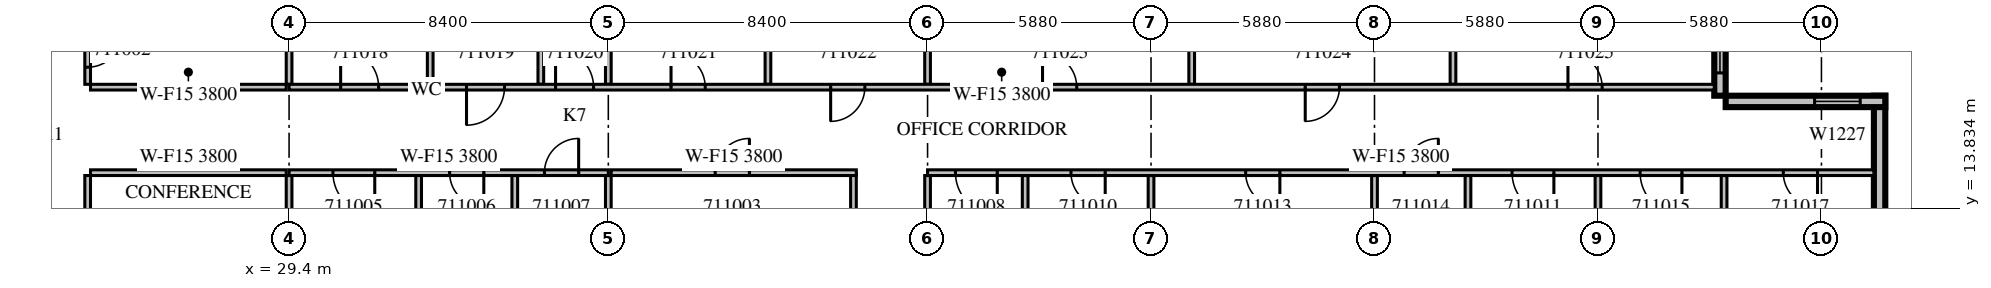
"""IFC4 building model, lengths in metres.
Left out: names, types, materials, properties, quantities, classifications, styles, units other than length and angle.
Written with IfcOpenShell. Run it as: python <this file> out.ifc"""

import sys

from ifc_helpers import new_model, si_unit, direction, frame, frame_2d, origin, place, context, subcontext, project, spatial, rectangle, extrude, source, transform, mapped, element, fill, save


model = new_model("IFC4")
c1 = context("Model", 3, precision=1e-05, world=origin(), true_north=direction((0.0, 1.0)))
c2 = subcontext(c1, "Body", "Model", "MODEL_VIEW")
j1 = project(units=[si_unit("LENGTHUNIT", "METRE"), si_unit("PLANEANGLEUNIT", "RADIAN")], contexts=[c1])
p1 = place(None, origin())
s1 = spatial("IfcSite", under=j1, at=p1, CompositionType="ELEMENT")
p2 = place(p1, origin())
s2 = spatial("IfcBuilding", under=s1, at=p2, CompositionType="ELEMENT")
p3 = place(p2, frame((0.0, 0.0, 57.3)))
s3 = spatial("IfcBuildingStorey", under=s2, at=p3, CompositionType="ELEMENT", Elevation=57.3)
m1 = source(origin(), c2, "Body", "SweptSolid", [
    extrude(rectangle(XDim=6.3, YDim=0.3, at=frame_2d((3.15, 0.0))), origin(), (0.0, 0.0, 1.0), 3.8),
])
p4 = place(p3, frame((71.25, 10.5, 0.0), z_axis=(0.0, 0.0, 1.0), x_axis=(0.0, 1.0, 0.0)))
e1 = element("IfcWall", 1, at=p4, inside=s3, PredefinedType="STANDARD", context=c2, shape_type="MappedRepresentation", body=[
    mapped(m1, transform((0.0, 0.0, 0.0), scale=1.0)),
])
m2 = source(origin(), c2, "Body", "SweptSolid", [
    extrude(rectangle(XDim=1.2, YDim=2.7, at=frame_2d((0.6, 1.35))), frame((0.0, 0.16, 0.0), z_axis=(0.0, -1.0, 0.0), x_axis=(1.0, 0.0, 0.0)), (0.0, 0.0, 1.0), 0.32),
])
p5 = place(p4, frame((1.062, 0.0, 0.6)))
e2 = element("IfcOpeningElement", 2, at=p5, cuts=e1, PredefinedType="OPENING", context=c2, shape_type="MappedRepresentation", body=[
    mapped(m2, transform((0.0, 0.0, 0.0), scale=1.0)),
])
m3 = source(origin(), c2, "Body", "SweptSolid", [
    extrude(rectangle(XDim=4.2, YDim=0.3, at=frame_2d((2.1, 0.0))), origin(), (0.0, 0.0, 1.0), 3.8),
])
p6 = place(p3, frame((71.4, 16.65, 0.0), z_axis=(0.0, 0.0, 1.0), x_axis=(-1.0, 0.0, 0.0)))
e3 = element("IfcWall", 3, at=p6, inside=s3, PredefinedType="STANDARD", context=c2, shape_type="MappedRepresentation", body=[
    mapped(m3, transform((0.0, 0.0, 0.0), scale=1.0)),
])
p7 = place(p6, frame((0.66, 0.0, 0.6)))
e4 = element("IfcOpeningElement", 4, at=p7, cuts=e3, PredefinedType="OPENING", context=c2, shape_type="MappedRepresentation", body=[
    mapped(m2, transform((0.0, 0.0, 0.0), scale=1.0)),
])
p8 = place(p3, frame((67.05, 16.8, 0.0), z_axis=(0.0, 0.0, 1.0), x_axis=(0.0, 1.0, 0.0)))
e5 = element("IfcWall", 5, at=p8, inside=s3, PredefinedType="STANDARD", context=c2, shape_type="MappedRepresentation", body=[
    mapped(m3, transform((0.0, 0.0, 0.0), scale=1.0)),
])
m4 = source(origin(), c2, "Body", "SweptSolid", [
    extrude(rectangle(XDim=3.0, YDim=2.7, at=frame_2d((1.5, 1.35))), frame((0.0, 0.16, 0.0), z_axis=(0.0, -1.0, 0.0), x_axis=(1.0, 0.0, 0.0)), (0.0, 0.0, 1.0), 0.32),
])
p9 = place(p8, frame((0.6, 0.0, 0.6)))
e6 = element("IfcOpeningElement", 6, at=p9, cuts=e5, PredefinedType="OPENING", context=c2, shape_type="MappedRepresentation", body=[
    mapped(m4, transform((0.0, 0.0, 0.0), scale=1.0)),
])
p10 = place(p3, frame((24.1, 14.7, 0.0), z_axis=(0.0, 0.0, 1.0), x_axis=(0.0, -1.0, 0.0)))
e7 = element("IfcWall", 7, at=p10, inside=s3, PredefinedType="PARTITIONING", context=c2, shape_type="SweptSolid", body=[
    extrude(rectangle(XDim=3.995, YDim=0.15, at=frame_2d((1.998, 0.0))), origin(), (0.0, 0.0, 1.0), 3.8),
])
m5 = source(origin(), c2, "Body", "SweptSolid", [
    extrude(rectangle(XDim=0.9, YDim=2.1, at=frame_2d((0.45, 1.05))), frame((0.0, 0.085, 0.0), z_axis=(0.0, -1.0, 0.0), x_axis=(1.0, 0.0, 0.0)), (0.0, 0.0, 1.0), 0.17),
])
p11 = place(p10, frame((0.963, 0.0, 0.0)))
e8 = element("IfcOpeningElement", 8, at=p11, cuts=e7, PredefinedType="OPENING", context=c2, shape_type="MappedRepresentation", body=[
    mapped(m5, transform((0.0, 0.0, 0.0), scale=1.0)),
])
m6 = source(origin(), c2, "Body", "SweptSolid", [
    extrude(rectangle(XDim=3.6, YDim=0.15, at=frame_2d((1.8, 0.0))), origin(), (0.0, 0.0, 1.0), 3.8),
])
p12 = place(p3, frame((24.1, 20.7, 0.0), z_axis=(0.0, 0.0, 1.0), x_axis=(0.0, -1.0, 0.0)))
e9 = element("IfcWall", 9, at=p12, inside=s3, PredefinedType="PARTITIONING", context=c2, shape_type="MappedRepresentation", body=[
    mapped(m6, transform((0.0, 0.0, 0.0), scale=1.0)),
])
p13 = place(p12, frame((2.25, 0.0, 0.0)))
e10 = element("IfcOpeningElement", 10, at=p13, cuts=e9, PredefinedType="OPENING", context=c2, shape_type="MappedRepresentation", body=[
    mapped(m5, transform((0.0, 0.0, 0.0), scale=1.0)),
])
m7 = source(origin(), c2, "Body", "SweptSolid", [
    extrude(rectangle(XDim=5.15, YDim=0.15, at=frame_2d((2.575, 0.0))), origin(), (0.0, 0.0, 1.0), 3.8),
])
for number, where, z_axis, x_axis in (
    (11, (29.325, 14.775, 0.0), (0.0, 0.0, 1.0), (-1.0, 0.0, 0.0)),
    (12, (24.175, 17.025, 0.0), (0.0, 0.0, 1.0), (1.0, 0.0, 0.0)),
):
    element("IfcWall", number, at=place(p3, frame(where, z_axis=z_axis, x_axis=x_axis)), inside=s3, PredefinedType="PARTITIONING", context=c2, shape_type="MappedRepresentation", body=[
        mapped(m7, transform((0.0, 0.0, 0.0), scale=1.0)),
    ])
p14 = place(p3, frame((29.4, 11.099, 0.0), z_axis=(0.0, 0.0, 1.0), x_axis=(0.0, 1.0, 0.0)))
e13 = element("IfcWall", 13, at=p14, inside=s3, PredefinedType="PARTITIONING", context=c2, shape_type="SweptSolid", body=[
    extrude(rectangle(XDim=3.601, YDim=0.15, at=frame_2d((1.8, 0.0))), origin(), (0.0, 0.0, 1.0), 3.8),
])
m8 = source(origin(), c2, "Body", "SweptSolid", [
    extrude(rectangle(XDim=2.701, YDim=0.15, at=frame_2d((1.351, 0.0))), origin(), (0.0, 0.0, 1.0), 3.8),
])
p15 = place(p3, frame((29.4, 17.1, 0.0), z_axis=(0.0, 0.0, 1.0), x_axis=(0.0, 1.0, 0.0)))
e14 = element("IfcWall", 14, at=p15, inside=s3, PredefinedType="PARTITIONING", context=c2, shape_type="MappedRepresentation", body=[
    mapped(m8, transform((0.0, 0.0, 0.0), scale=1.0)),
])
p16 = place(p3, frame((44.25, 11.9, 0.0), z_axis=(0.0, 0.0, 1.0), x_axis=(0.0, 1.0, 0.0)))
e15 = element("IfcWall", 15, at=p16, inside=s3, PredefinedType="PARTITIONING", context=c2, shape_type="SweptSolid", body=[
    extrude(rectangle(XDim=2.875, YDim=0.15, at=frame_2d((1.438, 0.0))), origin(), (0.0, 0.0, 1.0), 3.8),
])
m9 = source(origin(), c2, "Body", "SweptSolid", [
    extrude(rectangle(XDim=6.45, YDim=0.15, at=frame_2d((3.225, 0.0))), origin(), (0.0, 0.0, 1.0), 3.8),
])
p17 = place(p3, frame((44.325, 14.775, 0.0), z_axis=(0.0, 0.0, 1.0), x_axis=(-1.0, 0.0, 0.0)))
e16 = element("IfcWall", 16, at=p17, inside=s3, PredefinedType="PARTITIONING", context=c2, shape_type="MappedRepresentation", body=[
    mapped(m9, transform((0.0, 0.0, 0.0), scale=1.0)),
])
p18 = place(p17, frame((2.812, 0.0, 0.0)))
e17 = element("IfcOpeningElement", 17, at=p18, cuts=e16, PredefinedType="OPENING", context=c2, shape_type="MappedRepresentation", body=[
    mapped(m5, transform((0.0, 0.0, 0.0), scale=1.0)),
])
m10 = source(origin(), c2, "Body", "SweptSolid", [
    extrude(rectangle(XDim=3.995, YDim=0.15, at=frame_2d((1.998, 0.0))), origin(), (0.0, 0.0, 1.0), 3.8),
])
for number, where, z_axis, x_axis in (
    (18, (32.809, 10.705, 0.0), (0.0, 0.0, 1.0), (0.0, 1.0, 0.0)),
    (19, (35.339, 10.705, 0.0), (0.0, 0.0, 1.0), (0.0, 1.0, 0.0)),
):
    element("IfcWall", number, at=place(p3, frame(where, z_axis=z_axis, x_axis=x_axis)), inside=s3, PredefinedType="PARTITIONING", context=c2, shape_type="MappedRepresentation", body=[
        mapped(m10, transform((0.0, 0.0, 0.0), scale=1.0)),
    ])
m11 = source(origin(), c2, "Body", "SweptSolid", [
    extrude(rectangle(XDim=3.601, YDim=0.15, at=frame_2d((1.8, 0.0))), origin(), (0.0, 0.0, 1.0), 3.8),
])
p19 = place(p3, frame((37.8, 11.099, 0.0), z_axis=(0.0, 0.0, 1.0), x_axis=(0.0, 1.0, 0.0)))
e20 = element("IfcWall", 20, at=p19, inside=s3, PredefinedType="PARTITIONING", context=c2, shape_type="MappedRepresentation", body=[
    mapped(m11, transform((0.0, 0.0, 0.0), scale=1.0)),
])
p20 = place(p3, frame((48.768, 11.25, 0.0), z_axis=(0.0, 0.0, 1.0), x_axis=(0.0, 1.0, 0.0)))
e21 = element("IfcWall", 21, at=p20, inside=s3, PredefinedType="PARTITIONING", context=c2, shape_type="SweptSolid", body=[
    extrude(rectangle(XDim=3.45, YDim=0.15, at=frame_2d((1.725, 0.0))), origin(), (0.0, 0.0, 1.0), 3.8),
])
m12 = source(origin(), c2, "Body", "SweptSolid", [
    extrude(rectangle(XDim=3.45, YDim=0.15, at=frame_2d((1.725, 0.0))), origin(), (0.0, 0.0, 1.0), 3.8),
])
for number, where, z_axis, x_axis in (
    (22, (57.96, 11.25, 0.0), (0.0, 0.0, 1.0), (0.0, 1.0, 0.0)),
    (23, (60.42, 11.25, 0.0), (0.0, 0.0, 1.0), (0.0, 1.0, 0.0)),
    (24, (67.158, 11.25, 0.0), (0.0, 0.0, 1.0), (0.0, 1.0, 0.0)),
    (25, (46.2, 11.25, 0.0), (0.0, 0.0, 1.0), (0.0, 1.0, 0.0)),
    (26, (52.08, 11.25, 0.0), (0.0, 0.0, 1.0), (0.0, 1.0, 0.0)),
    (27, (63.84, 11.25, 0.0), (0.0, 0.0, 1.0), (0.0, 1.0, 0.0)),
):
    element("IfcWall", number, at=place(p3, frame(where, z_axis=z_axis, x_axis=x_axis)), inside=s3, PredefinedType="PARTITIONING", context=c2, shape_type="MappedRepresentation", body=[
        mapped(m12, transform((0.0, 0.0, 0.0), scale=1.0)),
    ])
for number, where, z_axis, x_axis in (
    (28, (33.113, 20.7, 0.0), (0.0, 0.0, 1.0), (0.0, -1.0, 0.0)),
    (29, (36.024, 20.7, 0.0), (0.0, 0.0, 1.0), (0.0, -1.0, 0.0)),
    (30, (42.0, 20.7, 0.0), (0.0, 0.0, 1.0), (0.0, -1.0, 0.0)),
    (31, (53.15, 20.7, 0.0), (0.0, 0.0, 1.0), (0.0, -1.0, 0.0)),
    (32, (60.025, 20.7, 0.0), (0.0, 0.0, 1.0), (0.0, -1.0, 0.0)),
):
    element("IfcWall", number, at=place(p3, frame(where, z_axis=z_axis, x_axis=x_axis)), inside=s3, PredefinedType="PARTITIONING", context=c2, shape_type="MappedRepresentation", body=[
        mapped(m6, transform((0.0, 0.0, 0.0), scale=1.0)),
    ])
for number, where, z_axis, x_axis in (
    (33, (37.8, 17.1, 0.0), (0.0, 0.0, 1.0), (0.0, 1.0, 0.0)),
    (34, (46.2, 17.1, 0.0), (0.0, 0.0, 1.0), (0.0, 1.0, 0.0)),
):
    element("IfcWall", number, at=place(p3, frame(where, z_axis=z_axis, x_axis=x_axis)), inside=s3, PredefinedType="PARTITIONING", context=c2, shape_type="MappedRepresentation", body=[
        mapped(m8, transform((0.0, 0.0, 0.0), scale=1.0)),
    ])
m13 = source(origin(), c2, "Body", "SweptSolid", [
    extrude(rectangle(XDim=8.4, YDim=0.15, at=frame_2d((4.2, 0.0))), origin(), (0.0, 0.0, 1.0), 3.8),
])
p21 = place(p3, frame((37.8, 14.775, 0.0), z_axis=(0.0, 0.0, 1.0), x_axis=(-1.0, 0.0, 0.0)))
e35 = element("IfcWall", 35, at=p21, inside=s3, PredefinedType="PARTITIONING", context=c2, shape_type="MappedRepresentation", body=[
    mapped(m13, transform((0.0, 0.0, 0.0), scale=1.0)),
])
m14 = source(origin(), c2, "Body", "SweptSolid", [
    extrude(rectangle(XDim=1.1, YDim=2.1, at=frame_2d((0.55, 1.05))), frame((0.0, 0.085, 0.0), z_axis=(0.0, -1.0, 0.0), x_axis=(1.0, 0.0, 0.0)), (0.0, 0.0, 1.0), 0.17),
])
p22 = place(p21, frame((6.146, 0.0, 0.0)))
e36 = element("IfcOpeningElement", 36, at=p22, cuts=e35, PredefinedType="OPENING", context=c2, shape_type="MappedRepresentation", body=[
    mapped(m14, transform((0.0, 0.0, 0.0), scale=1.0)),
])
p23 = place(p21, frame((3.276, 0.0, 0.0)))
e37 = element("IfcOpeningElement", 37, at=p23, cuts=e35, PredefinedType="OPENING", context=c2, shape_type="MappedRepresentation", body=[
    mapped(m5, transform((0.0, 0.0, 0.0), scale=1.0)),
])
p24 = place(p21, frame((0.781, 0.0, 0.0)))
e38 = element("IfcOpeningElement", 38, at=p24, cuts=e35, PredefinedType="OPENING", context=c2, shape_type="MappedRepresentation", body=[
    mapped(m5, transform((0.0, 0.0, 0.0), scale=1.0)),
])
m15 = source(origin(), c2, "Body", "SweptSolid", [
    extrude(rectangle(XDim=24.9, YDim=0.15, at=frame_2d((12.45, 0.0))), origin(), (0.0, 0.0, 1.0), 3.8),
])
p25 = place(p3, frame((71.1, 14.775, 0.0), z_axis=(0.0, 0.0, 1.0), x_axis=(-1.0, 0.0, 0.0)))
e39 = element("IfcWall", 39, at=p25, inside=s3, PredefinedType="PARTITIONING", context=c2, shape_type="MappedRepresentation", body=[
    mapped(m15, transform((0.0, 0.0, 0.0), scale=1.0)),
])
p26 = place(p25, frame((23.066, 0.0, 0.0)))
e40 = element("IfcOpeningElement", 40, at=p26, cuts=e39, PredefinedType="OPENING", context=c2, shape_type="MappedRepresentation", body=[
    mapped(m14, transform((0.0, 0.0, 0.0), scale=1.0)),
])
p27 = place(p25, frame((20.226, 0.0, 0.0)))
e41 = element("IfcOpeningElement", 41, at=p27, cuts=e39, PredefinedType="OPENING", context=c2, shape_type="MappedRepresentation", body=[
    mapped(m5, transform((0.0, 0.0, 0.0), scale=1.0)),
])
p28 = place(p25, frame((8.42, 0.0, 0.0)))
e42 = element("IfcOpeningElement", 42, at=p28, cuts=e39, PredefinedType="OPENING", context=c2, shape_type="MappedRepresentation", body=[
    mapped(m14, transform((0.0, 0.0, 0.0), scale=1.0)),
])
p29 = place(p25, frame((15.63, 0.0, 0.0)))
e43 = element("IfcOpeningElement", 43, at=p29, cuts=e39, PredefinedType="OPENING", context=c2, shape_type="MappedRepresentation", body=[
    mapped(m5, transform((0.0, 0.0, 0.0), scale=1.0)),
])
p30 = place(p25, frame((11.46, 0.0, 0.0)))
e44 = element("IfcOpeningElement", 44, at=p30, cuts=e39, PredefinedType="OPENING", context=c2, shape_type="MappedRepresentation", body=[
    mapped(m5, transform((0.0, 0.0, 0.0), scale=1.0)),
])
p31 = place(p25, frame((5.051, 0.0, 0.0)))
e45 = element("IfcOpeningElement", 45, at=p31, cuts=e39, PredefinedType="OPENING", context=c2, shape_type="MappedRepresentation", body=[
    mapped(m14, transform((0.0, 0.0, 0.0), scale=1.0)),
])
p32 = place(p25, frame((1.483, 0.0, 0.0)))
e46 = element("IfcOpeningElement", 46, at=p32, cuts=e39, PredefinedType="OPENING", context=c2, shape_type="MappedRepresentation", body=[
    mapped(m5, transform((0.0, 0.0, 0.0), scale=1.0)),
])
m16 = source(origin(), c2, "Body", "SweptSolid", [
    extrude(rectangle(XDim=37.5, YDim=0.15, at=frame_2d((18.75, 0.0))), origin(), (0.0, 0.0, 1.0), 3.8),
])
p33 = place(p3, frame((29.4, 17.025, 0.0), z_axis=(0.0, 0.0, 1.0), x_axis=(1.0, 0.0, 0.0)))
e47 = element("IfcWall", 47, at=p33, inside=s3, PredefinedType="PARTITIONING", context=c2, shape_type="MappedRepresentation", body=[
    mapped(m16, transform((0.0, 0.0, 0.0), scale=1.0)),
])
m17 = source(origin(), c2, "Body", "SweptSolid", [
    extrude(rectangle(XDim=1.0, YDim=2.1, at=frame_2d((0.5, 1.05))), frame((0.0, 0.085, 0.0), z_axis=(0.0, -1.0, 0.0), x_axis=(1.0, 0.0, 0.0)), (0.0, 0.0, 1.0), 0.17),
])
p34 = place(p33, frame((1.357, 0.0, 0.0)))
e48 = element("IfcOpeningElement", 48, at=p34, cuts=e47, PredefinedType="OPENING", context=c2, shape_type="MappedRepresentation", body=[
    mapped(m17, transform((0.0, 0.0, 0.0), scale=1.0)),
])
p35 = place(p33, frame((4.669, 0.0, 0.0)))
e49 = element("IfcOpeningElement", 49, at=p35, cuts=e47, PredefinedType="OPENING", context=c2, shape_type="MappedRepresentation", body=[
    mapped(m17, transform((0.0, 0.0, 0.0), scale=1.0)),
])
p36 = place(p33, frame((7.012, 0.0, 0.0)))
e50 = element("IfcOpeningElement", 50, at=p36, cuts=e47, PredefinedType="OPENING", context=c2, shape_type="MappedRepresentation", body=[
    mapped(m17, transform((0.0, 0.0, 0.0), scale=1.0)),
])
p37 = place(p33, frame((10.05, 0.0, 0.0)))
e51 = element("IfcOpeningElement", 51, at=p37, cuts=e47, PredefinedType="OPENING", context=c2, shape_type="MappedRepresentation", body=[
    mapped(m5, transform((0.0, 0.0, 0.0), scale=1.0)),
])
p38 = place(p33, frame((14.25, 0.0, 0.0)))
e52 = element("IfcOpeningElement", 52, at=p38, cuts=e47, PredefinedType="OPENING", context=c2, shape_type="MappedRepresentation", body=[
    mapped(m5, transform((0.0, 0.0, 0.0), scale=1.0)),
])
p39 = place(p33, frame((19.825, 0.0, 0.0)))
e53 = element("IfcOpeningElement", 53, at=p39, cuts=e47, PredefinedType="OPENING", context=c2, shape_type="MappedRepresentation", body=[
    mapped(m5, transform((0.0, 0.0, 0.0), scale=1.0)),
])
p40 = place(p33, frame((26.738, 0.0, 0.0)))
e54 = element("IfcOpeningElement", 54, at=p40, cuts=e47, PredefinedType="OPENING", context=c2, shape_type="MappedRepresentation", body=[
    mapped(m5, transform((0.0, 0.0, 0.0), scale=1.0)),
])
p41 = place(p33, frame((33.65, 0.0, 0.0)))
e55 = element("IfcOpeningElement", 55, at=p41, cuts=e47, PredefinedType="OPENING", context=c2, shape_type="MappedRepresentation", body=[
    mapped(m5, transform((0.0, 0.0, 0.0), scale=1.0)),
])
m18 = source(origin(), c2, "Body", "SweptSolid", [
    extrude(rectangle(XDim=1.2, YDim=2.7, at=frame_2d((0.6, 1.35))), frame((0.0, 0.03, 0.0), z_axis=(0.0, -1.0, 0.0), x_axis=(1.0, 0.0, 0.0)), (0.0, 0.0, 1.0), 0.06),
])
p42 = place(p7, origin())
e56 = element("IfcWindow", 56, at=p42, inside=s3, PartitioningType="SINGLE_PANEL", PredefinedType="WINDOW", context=c2, shape_type="MappedRepresentation", body=[
    mapped(m18, transform((0.0, 0.0, 0.0), scale=1.0)),
])
fill(e4, e56)
m19 = source(origin(), c2, "Body", "SweptSolid", [
    extrude(rectangle(XDim=3.0, YDim=2.7, at=frame_2d((1.5, 1.35))), frame((0.0, 0.03, 0.0), z_axis=(0.0, -1.0, 0.0), x_axis=(1.0, 0.0, 0.0)), (0.0, 0.0, 1.0), 0.06),
])
p43 = place(p9, origin())
e57 = element("IfcWindow", 57, at=p43, inside=s3, PartitioningType="SINGLE_PANEL", PredefinedType="WINDOW", context=c2, shape_type="MappedRepresentation", body=[
    mapped(m19, transform((0.0, 0.0, 0.0), scale=1.0)),
])
fill(e6, e57)
m20 = source(origin(), c2, "Body", "SweptSolid", [
    extrude(rectangle(XDim=0.9, YDim=2.1, at=frame_2d((0.45, 1.05))), frame((0.0, 0.025, 0.0), z_axis=(0.0, -1.0, 0.0), x_axis=(1.0, 0.0, 0.0)), (0.0, 0.0, 1.0), 0.05),
])
p44 = place(p13, origin())
e58 = element("IfcDoor", 58, at=p44, inside=s3, OperationType="SINGLE_SWING_LEFT", PredefinedType="DOOR", context=c2, shape_type="MappedRepresentation", body=[
    mapped(m20, transform((0.0, 0.0, 0.0), scale=1.0)),
])
fill(e10, e58)
p45 = place(p18, origin())
e59 = element("IfcDoor", 59, at=p45, inside=s3, OperationType="SINGLE_SWING_RIGHT", PredefinedType="DOOR", context=c2, shape_type="MappedRepresentation", body=[
    mapped(m20, transform((0.0, 0.0, 0.0), scale=1.0)),
])
fill(e17, e59)
m21 = source(origin(), c2, "Body", "SweptSolid", [
    extrude(rectangle(XDim=1.1, YDim=2.1, at=frame_2d((0.55, 1.05))), frame((0.0, 0.025, 0.0), z_axis=(0.0, -1.0, 0.0), x_axis=(1.0, 0.0, 0.0)), (0.0, 0.0, 1.0), 0.05),
])
p46 = place(p22, origin())
e60 = element("IfcDoor", 60, at=p46, inside=s3, OperationType="SINGLE_SWING_LEFT", PredefinedType="DOOR", context=c2, shape_type="MappedRepresentation", body=[
    mapped(m21, transform((0.0, 0.0, 0.0), scale=1.0)),
])
fill(e36, e60)
p47 = place(p23, origin())
e61 = element("IfcDoor", 61, at=p47, inside=s3, OperationType="SINGLE_SWING_LEFT", PredefinedType="DOOR", context=c2, shape_type="MappedRepresentation", body=[
    mapped(m20, transform((0.0, 0.0, 0.0), scale=1.0)),
])
fill(e37, e61)
p48 = place(p24, origin())
e62 = element("IfcDoor", 62, at=p48, inside=s3, OperationType="SINGLE_SWING_RIGHT", PredefinedType="DOOR", context=c2, shape_type="MappedRepresentation", body=[
    mapped(m20, transform((0.0, 0.0, 0.0), scale=1.0)),
])
fill(e38, e62)
p49 = place(p26, origin())
e63 = element("IfcDoor", 63, at=p49, inside=s3, OperationType="SINGLE_SWING_LEFT", PredefinedType="DOOR", context=c2, shape_type="MappedRepresentation", body=[
    mapped(m21, transform((0.0, 0.0, 0.0), scale=1.0)),
])
fill(e40, e63)
p50 = place(p27, origin())
e64 = element("IfcDoor", 64, at=p50, inside=s3, OperationType="SINGLE_SWING_LEFT", PredefinedType="DOOR", context=c2, shape_type="MappedRepresentation", body=[
    mapped(m20, transform((0.0, 0.0, 0.0), scale=1.0)),
])
fill(e41, e64)
p51 = place(p28, origin())
e65 = element("IfcDoor", 65, at=p51, inside=s3, OperationType="SINGLE_SWING_LEFT", PredefinedType="DOOR", context=c2, shape_type="MappedRepresentation", body=[
    mapped(m21, transform((0.0, 0.0, 0.0), scale=1.0)),
])
fill(e42, e65)
p52 = place(p29, origin())
e66 = element("IfcDoor", 66, at=p52, inside=s3, OperationType="SINGLE_SWING_LEFT", PredefinedType="DOOR", context=c2, shape_type="MappedRepresentation", body=[
    mapped(m20, transform((0.0, 0.0, 0.0), scale=1.0)),
])
fill(e43, e66)
p53 = place(p30, origin())
e67 = element("IfcDoor", 67, at=p53, inside=s3, OperationType="SINGLE_SWING_RIGHT", PredefinedType="DOOR", context=c2, shape_type="MappedRepresentation", body=[
    mapped(m20, transform((0.0, 0.0, 0.0), scale=1.0)),
])
fill(e44, e67)
p54 = place(p31, origin())
e68 = element("IfcDoor", 68, at=p54, inside=s3, OperationType="SINGLE_SWING_LEFT", PredefinedType="DOOR", context=c2, shape_type="MappedRepresentation", body=[
    mapped(m21, transform((0.0, 0.0, 0.0), scale=1.0)),
])
fill(e45, e68)
p55 = place(p32, origin())
e69 = element("IfcDoor", 69, at=p55, inside=s3, OperationType="SINGLE_SWING_LEFT", PredefinedType="DOOR", context=c2, shape_type="MappedRepresentation", body=[
    mapped(m20, transform((0.0, 0.0, 0.0), scale=1.0)),
])
fill(e46, e69)
m22 = source(origin(), c2, "Body", "SweptSolid", [
    extrude(rectangle(XDim=1.0, YDim=2.1, at=frame_2d((0.5, 1.05))), frame((0.0, 0.025, 0.0), z_axis=(0.0, -1.0, 0.0), x_axis=(1.0, 0.0, 0.0)), (0.0, 0.0, 1.0), 0.05),
])
p56 = place(p34, origin())
e70 = element("IfcDoor", 70, at=p56, inside=s3, OperationType="SINGLE_SWING_LEFT", PredefinedType="DOOR", context=c2, shape_type="MappedRepresentation", body=[
    mapped(m22, transform((0.0, 0.0, 0.0), scale=1.0)),
])
fill(e48, e70)
p57 = place(p35, origin())
e71 = element("IfcDoor", 71, at=p57, inside=s3, OperationType="SINGLE_SWING_RIGHT", PredefinedType="DOOR", context=c2, shape_type="MappedRepresentation", body=[
    mapped(m22, transform((0.0, 0.0, 0.0), scale=1.0)),
])
fill(e49, e71)
p58 = place(p36, origin())
e72 = element("IfcDoor", 72, at=p58, inside=s3, OperationType="SINGLE_SWING_LEFT", PredefinedType="DOOR", context=c2, shape_type="MappedRepresentation", body=[
    mapped(m22, transform((0.0, 0.0, 0.0), scale=1.0)),
])
fill(e50, e72)
p59 = place(p37, origin())
e73 = element("IfcDoor", 73, at=p59, inside=s3, OperationType="SINGLE_SWING_LEFT", PredefinedType="DOOR", context=c2, shape_type="MappedRepresentation", body=[
    mapped(m20, transform((0.0, 0.0, 0.0), scale=1.0)),
])
fill(e51, e73)
p60 = place(p38, origin())
e74 = element("IfcDoor", 74, at=p60, inside=s3, OperationType="SINGLE_SWING_RIGHT", PredefinedType="DOOR", context=c2, shape_type="MappedRepresentation", body=[
    mapped(m20, transform((0.0, 0.0, 0.0), scale=1.0)),
])
fill(e52, e74)
p61 = place(p39, origin())
e75 = element("IfcDoor", 75, at=p61, inside=s3, OperationType="SINGLE_SWING_LEFT", PredefinedType="DOOR", context=c2, shape_type="MappedRepresentation", body=[
    mapped(m20, transform((0.0, 0.0, 0.0), scale=1.0)),
])
fill(e53, e75)
p62 = place(p40, origin())
e76 = element("IfcDoor", 76, at=p62, inside=s3, OperationType="SINGLE_SWING_RIGHT", PredefinedType="DOOR", context=c2, shape_type="MappedRepresentation", body=[
    mapped(m20, transform((0.0, 0.0, 0.0), scale=1.0)),
])
fill(e54, e76)
p63 = place(p41, origin())
e77 = element("IfcDoor", 77, at=p63, inside=s3, OperationType="SINGLE_SWING_LEFT", PredefinedType="DOOR", context=c2, shape_type="MappedRepresentation", body=[
    mapped(m20, transform((0.0, 0.0, 0.0), scale=1.0)),
])
fill(e55, e77)
save(model, sys.argv[1])
